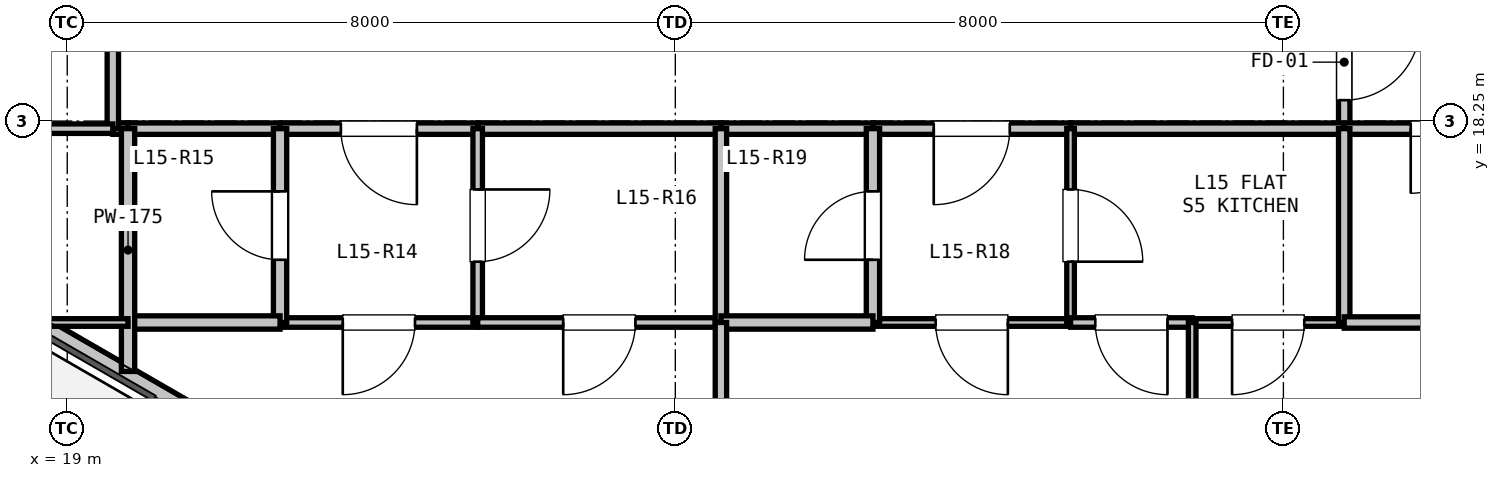
"""IFC4 building model, lengths in metres.
Left out: names, types, materials, properties, quantities, classifications, styles, units other than length and angle.
Written with IfcOpenShell. Run it as: python <this file> out.ifc"""

import sys

from ifc_helpers import new_model, si_unit, direction, frame, frame_2d, origin, place, context, subcontext, project, spatial, rectangle, extrude, element, fill, save


model = new_model("IFC4")
c1 = context("Model", 3, precision=1e-05, world=origin(), true_north=direction((0.0, 1.0)))
c2 = subcontext(c1, "Body", "Model", "MODEL_VIEW")
j1 = project(units=[si_unit("LENGTHUNIT", "METRE"), si_unit("PLANEANGLEUNIT", "RADIAN")], contexts=[c1])
p1 = place(None, origin())
s1 = spatial("IfcSite", under=j1, at=p1, CompositionType="ELEMENT")
p2 = place(p1, origin())
s2 = spatial("IfcBuilding", under=s1, at=p2, CompositionType="ELEMENT")
p3 = place(p2, frame((0.0, 0.0, 55.5)))
s3 = spatial("IfcBuildingStorey", under=s2, at=p3, CompositionType="ELEMENT", Elevation=55.5)
p4 = place(p3, frame((26.76, 10.896, 0.0), z_axis=(0.0, 0.0, 1.0), x_axis=(-0.866027351828, 0.499996625875, 0.0)))
e1 = element("IfcWall", 1, at=p4, inside=s3, PredefinedType="PARAPET", context=c2, shape_type="SweptSolid", body=[
    extrude(rectangle(XDim=11.973, YDim=0.2, at=frame_2d((5.987, 0.0))), origin(), (0.0, 0.0, 1.0), 0.2),
])
p5 = place(p3, frame((35.8, 19.9, 0.0), z_axis=(0.0, 0.0, 1.0), x_axis=(0.0, -1.0, 0.0)))
e2 = element("IfcWall", 2, at=p5, inside=s3, PredefinedType="PARTITIONING", context=c2, shape_type="SweptSolid", body=[
    extrude(rectangle(XDim=1.75, YDim=0.15, at=frame_2d((0.875, 0.0))), origin(), (0.0, 0.0, 1.0), 3.04),
])
p6 = place(p5, frame((0.375, 0.0, 0.0)))
e3 = element("IfcOpeningElement", 3, at=p6, cuts=e2, PredefinedType="OPENING", context=c2, shape_type="SweptSolid", body=[
    extrude(rectangle(XDim=1.0, YDim=2.15, at=frame_2d((0.5, 1.075))), frame((0.0, 0.085, 0.0), z_axis=(0.0, -1.0, 0.0), x_axis=(1.0, 0.0, 0.0)), (0.0, 0.0, 1.0), 0.17),
])
p7 = place(p3, frame((35.8, 18.15, 0.0), z_axis=(0.0, 0.0, 1.0), x_axis=(-1.0, 0.0, 0.0)))
e4 = element("IfcWall", 4, at=p7, inside=s3, PredefinedType="PARTITIONING", context=c2, shape_type="SweptSolid", body=[
    extrude(rectangle(XDim=3.6, YDim=0.15, at=frame_2d((1.8, 0.0))), origin(), (0.0, 0.0, 1.0), 3.04),
])
p8 = place(p3, frame((32.2, 18.15, 0.0), z_axis=(0.0, 0.0, 1.0), x_axis=(-1.0, 0.0, 0.0)))
e5 = element("IfcWall", 5, at=p8, inside=s3, PredefinedType="PARTITIONING", context=c2, shape_type="SweptSolid", body=[
    extrude(rectangle(XDim=2.6, YDim=0.15, at=frame_2d((1.3, 0.0))), origin(), (0.0, 0.0, 1.0), 3.04),
])
p9 = place(p8, frame((0.8, 0.0, 0.0)))
e6 = element("IfcOpeningElement", 6, at=p9, cuts=e5, PredefinedType="OPENING", context=c2, shape_type="SweptSolid", body=[
    extrude(rectangle(XDim=1.0, YDim=2.15, at=frame_2d((0.5, 1.075))), frame((0.0, 0.085, 0.0), z_axis=(0.0, -1.0, 0.0), x_axis=(1.0, 0.0, 0.0)), (0.0, 0.0, 1.0), 0.17),
])
p10 = place(p3, frame((29.6, 18.15, 0.0), z_axis=(0.0, 0.0, 1.0), x_axis=(-1.0, 0.0, 0.0)))
e7 = element("IfcWall", 7, at=p10, inside=s3, PredefinedType="PARTITIONING", context=c2, shape_type="SweptSolid", body=[
    extrude(rectangle(XDim=2.0, YDim=0.15, at=frame_2d((1.0, 0.0))), origin(), (0.0, 0.0, 1.0), 3.04),
])
p11 = place(p3, frame((27.6, 18.15, 0.0), z_axis=(0.0, 0.0, 1.0), x_axis=(-1.0, 0.0, 0.0)))
e8 = element("IfcWall", 8, at=p11, inside=s3, PredefinedType="PARTITIONING", context=c2, shape_type="SweptSolid", body=[
    extrude(rectangle(XDim=3.2, YDim=0.15, at=frame_2d((1.6, 0.0))), origin(), (0.0, 0.0, 1.0), 3.04),
])
p12 = place(p3, frame((24.4, 18.15, 0.0), z_axis=(0.0, 0.0, 1.0), x_axis=(-1.0, 0.0, 0.0)))
e9 = element("IfcWall", 9, at=p12, inside=s3, PredefinedType="PARTITIONING", context=c2, shape_type="SweptSolid", body=[
    extrude(rectangle(XDim=2.6, YDim=0.15, at=frame_2d((1.3, 0.0))), origin(), (0.0, 0.0, 1.0), 2.337),
])
p13 = place(p12, frame((0.8, 0.0, 0.0)))
e10 = element("IfcOpeningElement", 10, at=p13, cuts=e9, PredefinedType="OPENING", context=c2, shape_type="SweptSolid", body=[
    extrude(rectangle(XDim=1.0, YDim=2.15, at=frame_2d((0.5, 1.075))), frame((0.0, 0.085, 0.0), z_axis=(0.0, -1.0, 0.0), x_axis=(1.0, 0.0, 0.0)), (0.0, 0.0, 1.0), 0.17),
])
p14 = place(p3, frame((21.8, 18.15, 0.0), z_axis=(0.0, 0.0, 1.0), x_axis=(-1.0, 0.0, 0.0)))
e11 = element("IfcWall", 11, at=p14, inside=s3, PredefinedType="PARTITIONING", context=c2, shape_type="SweptSolid", body=[
    extrude(rectangle(XDim=2.0, YDim=0.15, at=frame_2d((1.0, 0.0))), origin(), (0.0, 0.0, 1.0), 3.04),
])
p15 = place(p3, frame((19.8, 18.15, 0.0), z_axis=(0.0, 0.0, 1.0), x_axis=(-1.0, 0.0, 0.0)))
e12 = element("IfcWall", 12, at=p15, inside=s3, PredefinedType="PARTITIONING", context=c2, shape_type="SweptSolid", body=[
    extrude(rectangle(XDim=0.2, YDim=0.15, at=frame_2d((0.1, 0.0))), origin(), (0.0, 0.0, 1.0), 3.04),
])
p16 = place(p3, frame((19.6, 18.15, 0.0), z_axis=(0.0, 0.0, 1.0), x_axis=(0.0, 1.0, 0.0)))
e13 = element("IfcWall", 13, at=p16, inside=s3, PredefinedType="PARTITIONING", context=c2, shape_type="SweptSolid", body=[
    extrude(rectangle(XDim=3.55, YDim=0.15, at=frame_2d((1.775, 0.0))), origin(), (0.0, 0.0, 1.0), 2.337),
])
p17 = place(p3, frame((38.4, 18.15, 0.0), z_axis=(0.0, 0.0, 1.0), x_axis=(-1.0, 0.0, 0.0)))
e14 = element("IfcWall", 14, at=p17, inside=s3, PredefinedType="PARTITIONING", context=c2, shape_type="SweptSolid", body=[
    extrude(rectangle(XDim=2.6, YDim=0.15, at=frame_2d((1.3, 0.0))), origin(), (0.0, 0.0, 1.0), 2.337),
])
p18 = place(p17, frame((0.875, 0.0, 0.0)))
e15 = element("IfcOpeningElement", 15, at=p18, cuts=e14, PredefinedType="OPENING", context=c2, shape_type="SweptSolid", body=[
    extrude(rectangle(XDim=0.85, YDim=2.1, at=frame_2d((0.425, 1.05))), frame((0.0, 0.085, 0.0), z_axis=(0.0, -1.0, 0.0), x_axis=(1.0, 0.0, 0.0)), (0.0, 0.0, 1.0), 0.17),
])
p19 = place(p3, frame((24.4, 15.6, 0.0), z_axis=(0.0, 0.0, 1.0), x_axis=(-1.0, 0.0, 0.0)))
e16 = element("IfcWall", 16, at=p19, inside=s3, PredefinedType="PARTITIONING", context=c2, shape_type="SweptSolid", body=[
    extrude(rectangle(XDim=2.6, YDim=0.125, at=frame_2d((1.3, 0.0))), origin(), (0.0, 0.0, 1.0), 3.04),
])
p20 = place(p19, frame((0.825, 0.0, 0.0)))
e17 = element("IfcOpeningElement", 17, at=p20, cuts=e16, PredefinedType="OPENING", context=c2, shape_type="SweptSolid", body=[
    extrude(rectangle(XDim=0.95, YDim=2.1, at=frame_2d((0.475, 1.05))), frame((0.0, 0.073, 0.0), z_axis=(0.0, -1.0, 0.0), x_axis=(1.0, 0.0, 0.0)), (0.0, 0.0, 1.0), 0.145),
])
p21 = place(p3, frame((21.8, 15.6, 0.0), z_axis=(0.0, 0.0, 1.0), x_axis=(0.0, 1.0, 0.0)))
e18 = element("IfcWall", 18, at=p21, inside=s3, PredefinedType="PLUMBINGWALL", context=c2, shape_type="SweptSolid", body=[
    extrude(rectangle(XDim=2.55, YDim=0.175, at=frame_2d((1.275, 0.0))), origin(), (0.0, 0.0, 1.0), 3.04),
])
p22 = place(p21, frame((0.825, 0.0, 0.0)))
e19 = element("IfcOpeningElement", 19, at=p22, cuts=e18, PredefinedType="OPENING", context=c2, shape_type="SweptSolid", body=[
    extrude(rectangle(XDim=0.9, YDim=2.1, at=frame_2d((0.45, 1.05))), frame((0.0, 0.097, 0.0), z_axis=(0.0, -1.0, 0.0), x_axis=(1.0, 0.0, 0.0)), (0.0, 0.0, 1.0), 0.195),
])
p23 = place(p3, frame((24.4, 18.15, 0.0), z_axis=(0.0, 0.0, 1.0), x_axis=(0.0, -1.0, 0.0)))
e20 = element("IfcWall", 20, at=p23, inside=s3, PredefinedType="PARTITIONING", context=c2, shape_type="SweptSolid", body=[
    extrude(rectangle(XDim=2.55, YDim=0.125, at=frame_2d((1.275, 0.0))), origin(), (0.0, 0.0, 1.0), 2.337),
])
p24 = place(p23, frame((0.8, 0.0, 0.0)))
e21 = element("IfcOpeningElement", 21, at=p24, cuts=e20, PredefinedType="OPENING", context=c2, shape_type="SweptSolid", body=[
    extrude(rectangle(XDim=0.95, YDim=2.1, at=frame_2d((0.475, 1.05))), frame((0.0, 0.073, 0.0), z_axis=(0.0, -1.0, 0.0), x_axis=(1.0, 0.0, 0.0)), (0.0, 0.0, 1.0), 0.145),
])
p25 = place(p3, frame((32.2, 15.6, 0.0), z_axis=(0.0, 0.0, 1.0), x_axis=(-1.0, 0.0, 0.0)))
e22 = element("IfcWall", 22, at=p25, inside=s3, PredefinedType="PARTITIONING", context=c2, shape_type="SweptSolid", body=[
    extrude(rectangle(XDim=2.6, YDim=0.1, at=frame_2d((1.3, 0.0))), origin(), (0.0, 0.0, 1.0), 3.04),
])
p26 = place(p25, frame((0.825, 0.0, 0.0)))
e23 = element("IfcOpeningElement", 23, at=p26, cuts=e22, PredefinedType="OPENING", context=c2, shape_type="SweptSolid", body=[
    extrude(rectangle(XDim=0.95, YDim=2.1, at=frame_2d((0.475, 1.05))), frame((0.0, 0.06, 0.0), z_axis=(0.0, -1.0, 0.0), x_axis=(1.0, 0.0, 0.0)), (0.0, 0.0, 1.0), 0.12),
])
p27 = place(p3, frame((29.6, 15.6, 0.0), z_axis=(0.0, 0.0, 1.0), x_axis=(0.0, 1.0, 0.0)))
e24 = element("IfcWall", 24, at=p27, inside=s3, PredefinedType="PLUMBINGWALL", context=c2, shape_type="SweptSolid", body=[
    extrude(rectangle(XDim=2.55, YDim=0.175, at=frame_2d((1.275, 0.0))), origin(), (0.0, 0.0, 1.0), 3.04),
])
p28 = place(p27, frame((0.825, 0.0, 0.0)))
e25 = element("IfcOpeningElement", 25, at=p28, cuts=e24, PredefinedType="OPENING", context=c2, shape_type="SweptSolid", body=[
    extrude(rectangle(XDim=0.9, YDim=2.1, at=frame_2d((0.45, 1.05))), frame((0.0, 0.097, 0.0), z_axis=(0.0, -1.0, 0.0), x_axis=(1.0, 0.0, 0.0)), (0.0, 0.0, 1.0), 0.195),
])
p29 = place(p3, frame((32.2, 18.15, 0.0), z_axis=(0.0, 0.0, 1.0), x_axis=(0.0, -1.0, 0.0)))
e26 = element("IfcWall", 26, at=p29, inside=s3, PredefinedType="PARTITIONING", context=c2, shape_type="SweptSolid", body=[
    extrude(rectangle(XDim=2.55, YDim=0.1, at=frame_2d((1.275, 0.0))), origin(), (0.0, 0.0, 1.0), 3.04),
])
p30 = place(p29, frame((0.8, 0.0, 0.0)))
e27 = element("IfcOpeningElement", 27, at=p30, cuts=e26, PredefinedType="OPENING", context=c2, shape_type="SweptSolid", body=[
    extrude(rectangle(XDim=0.95, YDim=2.1, at=frame_2d((0.475, 1.05))), frame((0.0, 0.06, 0.0), z_axis=(0.0, -1.0, 0.0), x_axis=(1.0, 0.0, 0.0)), (0.0, 0.0, 1.0), 0.12),
])
p31 = place(p3, frame((21.8, 15.6, 0.0), z_axis=(0.0, 0.0, 1.0), x_axis=(-1.0, 0.0, 0.0)))
e28 = element("IfcWall", 28, at=p31, inside=s3, PredefinedType="PLUMBINGWALL", context=c2, shape_type="SweptSolid", body=[
    extrude(rectangle(XDim=2.0, YDim=0.175, at=frame_2d((1.0, 0.0))), origin(), (0.0, 0.0, 1.0), 2.365),
])
p32 = place(p3, frame((19.8, 14.956, 0.0), z_axis=(0.0, 0.0, 1.0), x_axis=(0.0, 1.0, 0.0)))
e29 = element("IfcWall", 29, at=p32, inside=s3, PredefinedType="PLUMBINGWALL", context=c2, shape_type="SweptSolid", body=[
    extrude(rectangle(XDim=3.194, YDim=0.175, at=frame_2d((1.597, 0.0))), origin(), (0.0, 0.0, 1.0), 2.365),
])
p33 = place(p3, frame((27.6, 15.6, 0.0), z_axis=(0.0, 0.0, 1.0), x_axis=(-1.0, 0.0, 0.0)))
e30 = element("IfcWall", 30, at=p33, inside=s3, PredefinedType="PARTITIONING", context=c2, shape_type="SweptSolid", body=[
    extrude(rectangle(XDim=3.2, YDim=0.125, at=frame_2d((1.6, 0.0))), origin(), (0.0, 0.0, 1.0), 2.337),
])
p34 = place(p33, frame((1.125, 0.0, 0.0)))
e31 = element("IfcOpeningElement", 31, at=p34, cuts=e30, PredefinedType="OPENING", context=c2, shape_type="SweptSolid", body=[
    extrude(rectangle(XDim=0.95, YDim=2.1, at=frame_2d((0.475, 1.05))), frame((0.0, 0.073, 0.0), z_axis=(0.0, -1.0, 0.0), x_axis=(1.0, 0.0, 0.0)), (0.0, 0.0, 1.0), 0.145),
])
p35 = place(p3, frame((27.6, 18.15, 0.0), z_axis=(0.0, 0.0, 1.0), x_axis=(0.0, -1.0, 0.0)))
e32 = element("IfcWall", 32, at=p35, inside=s3, PredefinedType="PARTITIONING", context=c2, shape_type="SweptSolid", body=[
    extrude(rectangle(XDim=2.55, YDim=0.15, at=frame_2d((1.275, 0.0))), origin(), (0.0, 0.0, 1.0), 3.04),
])
p36 = place(p3, frame((29.6, 15.6, 0.0), z_axis=(0.0, 0.0, 1.0), x_axis=(-1.0, 0.0, 0.0)))
e33 = element("IfcWall", 33, at=p36, inside=s3, PredefinedType="PLUMBINGWALL", context=c2, shape_type="SweptSolid", body=[
    extrude(rectangle(XDim=2.0, YDim=0.175, at=frame_2d((1.0, 0.0))), origin(), (0.0, 0.0, 1.0), 3.04),
])
p37 = place(p3, frame((35.8, 15.6, 0.0), z_axis=(0.0, 0.0, 1.0), x_axis=(-1.0, 0.0, 0.0)))
e34 = element("IfcWall", 34, at=p37, inside=s3, PredefinedType="PARTITIONING", context=c2, shape_type="SweptSolid", body=[
    extrude(rectangle(XDim=2.0, YDim=0.1, at=frame_2d((1.0, 0.0))), origin(), (0.0, 0.0, 1.0), 3.04),
])
p38 = place(p37, frame((0.525, 0.0, 0.0)))
e35 = element("IfcOpeningElement", 35, at=p38, cuts=e34, PredefinedType="OPENING", context=c2, shape_type="SweptSolid", body=[
    extrude(rectangle(XDim=0.95, YDim=2.1, at=frame_2d((0.475, 1.05))), frame((0.0, 0.06, 0.0), z_axis=(0.0, -1.0, 0.0), x_axis=(1.0, 0.0, 0.0)), (0.0, 0.0, 1.0), 0.12),
])
p39 = place(p3, frame((33.8, 15.6, 0.0), z_axis=(0.0, 0.0, 1.0), x_axis=(-1.0, 0.0, 0.0)))
e36 = element("IfcWall", 36, at=p39, inside=s3, PredefinedType="PARTITIONING", context=c2, shape_type="SweptSolid", body=[
    extrude(rectangle(XDim=1.6, YDim=0.125, at=frame_2d((0.8, 0.0))), origin(), (0.0, 0.0, 1.0), 3.04),
])
p40 = place(p39, frame((0.325, 0.0, 0.0)))
e37 = element("IfcOpeningElement", 37, at=p40, cuts=e36, PredefinedType="OPENING", context=c2, shape_type="SweptSolid", body=[
    extrude(rectangle(XDim=0.95, YDim=2.1, at=frame_2d((0.475, 1.05))), frame((0.0, 0.073, 0.0), z_axis=(0.0, -1.0, 0.0), x_axis=(1.0, 0.0, 0.0)), (0.0, 0.0, 1.0), 0.145),
])
p41 = place(p3, frame((35.8, 18.15, 0.0), z_axis=(0.0, 0.0, 1.0), x_axis=(0.0, -1.0, 0.0)))
e38 = element("IfcWall", 38, at=p41, inside=s3, PredefinedType="PARTITIONING", context=c2, shape_type="SweptSolid", body=[
    extrude(rectangle(XDim=2.55, YDim=0.15, at=frame_2d((1.275, 0.0))), origin(), (0.0, 0.0, 1.0), 3.04),
])
p42 = place(p3, frame((19.6, 18.15, 0.0), z_axis=(0.0, 0.0, 1.0), x_axis=(-1.0, 0.0, 0.0)))
e39 = element("IfcWall", 39, at=p42, inside=s3, PredefinedType="PARTITIONING", context=c2, shape_type="SweptSolid", body=[
    extrude(rectangle(XDim=2.45, YDim=0.125, at=frame_2d((1.225, 0.0))), origin(), (0.0, 0.0, 1.0), 3.04),
])
p43 = place(p3, frame((43.688, 15.6, 0.0), z_axis=(0.0, 0.0, 1.0), x_axis=(-1.0, 0.0, 0.0)))
e40 = element("IfcWall", 40, at=p43, inside=s3, PredefinedType="PARTITIONING", context=c2, shape_type="SweptSolid", body=[
    extrude(rectangle(XDim=7.888, YDim=0.15, at=frame_2d((3.944, 0.0))), origin(), (0.0, 0.0, 1.0), 2.337),
])
p44 = place(p3, frame((18.678, 15.6, 0.0), z_axis=(0.0, 0.0, 1.0), x_axis=(1.0, 0.0, 0.0)))
e41 = element("IfcWall", 41, at=p44, inside=s3, PredefinedType="PARTITIONING", context=c2, shape_type="SweptSolid", body=[
    extrude(rectangle(XDim=1.122, YDim=0.1, at=frame_2d((0.561, 0.0))), origin(), (0.0, 0.0, 1.0), 2.365),
])
p45 = place(p3, frame((27.6, 15.6, 0.0), z_axis=(0.0, 0.0, 1.0), x_axis=(0.0, -1.0, 0.0)))
e42 = element("IfcWall", 42, at=p45, inside=s3, PredefinedType="PARTITIONING", context=c2, shape_type="SweptSolid", body=[
    extrude(rectangle(XDim=4.838, YDim=0.15, at=frame_2d((2.419, 0.0))), origin(), (0.0, 0.0, 1.0), 2.337),
])
p46 = place(p3, frame((33.8, 15.6, 0.0), z_axis=(0.0, 0.0, 1.0), x_axis=(0.0, -1.0, 0.0)))
e43 = element("IfcWall", 43, at=p46, inside=s3, PredefinedType="PARTITIONING", context=c2, shape_type="SweptSolid", body=[
    extrude(rectangle(XDim=5.98, YDim=0.1, at=frame_2d((2.99, 0.0))), origin(), (0.0, 0.0, 1.0), 3.04),
])
p47 = place(p46, frame((2.515, 0.0, 0.0)))
e44 = element("IfcOpeningElement", 44, at=p47, cuts=e43, PredefinedType="OPENING", context=c2, shape_type="SweptSolid", body=[
    extrude(rectangle(XDim=0.95, YDim=2.1, at=frame_2d((0.475, 1.05))), frame((0.0, 0.06, 0.0), z_axis=(0.0, -1.0, 0.0), x_axis=(1.0, 0.0, 0.0)), (0.0, 0.0, 1.0), 0.12),
])
p48 = place(p6, origin())
e45 = element("IfcDoor", 45, at=p48, inside=s3, OperationType="SINGLE_SWING_LEFT", PredefinedType="DOOR", context=c2, shape_type="SweptSolid", body=[
    extrude(rectangle(XDim=1.0, YDim=2.15, at=frame_2d((0.5, 1.075))), frame((0.0, 0.025, 0.0), z_axis=(0.0, -1.0, 0.0), x_axis=(1.0, 0.0, 0.0)), (0.0, 0.0, 1.0), 0.05),
])
fill(e3, e45)
p49 = place(p13, origin())
e46 = element("IfcDoor", 46, at=p49, inside=s3, OperationType="SINGLE_SWING_LEFT", PredefinedType="DOOR", context=c2, shape_type="SweptSolid", body=[
    extrude(rectangle(XDim=1.0, YDim=2.15, at=frame_2d((0.5, 1.075))), frame((0.0, 0.025, 0.0), z_axis=(0.0, -1.0, 0.0), x_axis=(1.0, 0.0, 0.0)), (0.0, 0.0, 1.0), 0.05),
])
fill(e10, e46)
p50 = place(p9, origin())
e47 = element("IfcDoor", 47, at=p50, inside=s3, OperationType="SINGLE_SWING_RIGHT", PredefinedType="DOOR", context=c2, shape_type="SweptSolid", body=[
    extrude(rectangle(XDim=1.0, YDim=2.15, at=frame_2d((0.5, 1.075))), frame((0.0, 0.025, 0.0), z_axis=(0.0, -1.0, 0.0), x_axis=(1.0, 0.0, 0.0)), (0.0, 0.0, 1.0), 0.05),
])
fill(e6, e47)
p51 = place(p18, origin())
e48 = element("IfcDoor", 48, at=p51, inside=s3, OperationType="SINGLE_SWING_RIGHT", PredefinedType="DOOR", context=c2, shape_type="SweptSolid", body=[
    extrude(rectangle(XDim=0.85, YDim=2.1, at=frame_2d((0.425, 1.05))), frame((0.0, 0.025, 0.0), z_axis=(0.0, -1.0, 0.0), x_axis=(1.0, 0.0, 0.0)), (0.0, 0.0, 1.0), 0.05),
])
fill(e15, e48)
p52 = place(p22, origin())
e49 = element("IfcDoor", 49, at=p52, inside=s3, OperationType="SINGLE_SWING_RIGHT", PredefinedType="DOOR", context=c2, shape_type="SweptSolid", body=[
    extrude(rectangle(XDim=0.9, YDim=2.1, at=frame_2d((0.45, 1.05))), frame((0.0, 0.025, 0.0), z_axis=(0.0, -1.0, 0.0), x_axis=(1.0, 0.0, 0.0)), (0.0, 0.0, 1.0), 0.05),
])
fill(e19, e49)
p53 = place(p24, origin())
e50 = element("IfcDoor", 50, at=p53, inside=s3, OperationType="SINGLE_SWING_LEFT", PredefinedType="DOOR", context=c2, shape_type="SweptSolid", body=[
    extrude(rectangle(XDim=0.95, YDim=2.1, at=frame_2d((0.475, 1.05))), frame((0.0, 0.025, 0.0), z_axis=(0.0, -1.0, 0.0), x_axis=(1.0, 0.0, 0.0)), (0.0, 0.0, 1.0), 0.05),
])
fill(e21, e50)
p54 = place(p20, origin())
e51 = element("IfcDoor", 51, at=p54, inside=s3, OperationType="SINGLE_SWING_RIGHT", PredefinedType="DOOR", context=c2, shape_type="SweptSolid", body=[
    extrude(rectangle(XDim=0.95, YDim=2.1, at=frame_2d((0.475, 1.05))), frame((0.0, 0.025, 0.0), z_axis=(0.0, -1.0, 0.0), x_axis=(1.0, 0.0, 0.0)), (0.0, 0.0, 1.0), 0.05),
])
fill(e17, e51)
p55 = place(p28, origin())
e52 = element("IfcDoor", 52, at=p55, inside=s3, OperationType="SINGLE_SWING_LEFT", PredefinedType="DOOR", context=c2, shape_type="SweptSolid", body=[
    extrude(rectangle(XDim=0.9, YDim=2.1, at=frame_2d((0.45, 1.05))), frame((0.0, 0.025, 0.0), z_axis=(0.0, -1.0, 0.0), x_axis=(1.0, 0.0, 0.0)), (0.0, 0.0, 1.0), 0.05),
])
fill(e25, e52)
p56 = place(p30, origin())
e53 = element("IfcDoor", 53, at=p56, inside=s3, OperationType="SINGLE_SWING_RIGHT", PredefinedType="DOOR", context=c2, shape_type="SweptSolid", body=[
    extrude(rectangle(XDim=0.95, YDim=2.1, at=frame_2d((0.475, 1.05))), frame((0.0, 0.025, 0.0), z_axis=(0.0, -1.0, 0.0), x_axis=(1.0, 0.0, 0.0)), (0.0, 0.0, 1.0), 0.05),
])
fill(e27, e53)
p57 = place(p26, origin())
e54 = element("IfcDoor", 54, at=p57, inside=s3, OperationType="SINGLE_SWING_LEFT", PredefinedType="DOOR", context=c2, shape_type="SweptSolid", body=[
    extrude(rectangle(XDim=0.95, YDim=2.1, at=frame_2d((0.475, 1.05))), frame((0.0, 0.025, 0.0), z_axis=(0.0, -1.0, 0.0), x_axis=(1.0, 0.0, 0.0)), (0.0, 0.0, 1.0), 0.05),
])
fill(e23, e54)
p58 = place(p34, origin())
e55 = element("IfcDoor", 55, at=p58, inside=s3, OperationType="SINGLE_SWING_RIGHT", PredefinedType="DOOR", context=c2, shape_type="SweptSolid", body=[
    extrude(rectangle(XDim=0.95, YDim=2.1, at=frame_2d((0.475, 1.05))), frame((0.0, 0.025, 0.0), z_axis=(0.0, -1.0, 0.0), x_axis=(1.0, 0.0, 0.0)), (0.0, 0.0, 1.0), 0.05),
])
fill(e31, e55)
p59 = place(p40, origin())
e56 = element("IfcDoor", 56, at=p59, inside=s3, OperationType="SINGLE_SWING_LEFT", PredefinedType="DOOR", context=c2, shape_type="SweptSolid", body=[
    extrude(rectangle(XDim=0.95, YDim=2.1, at=frame_2d((0.475, 1.05))), frame((0.0, 0.025, 0.0), z_axis=(0.0, -1.0, 0.0), x_axis=(1.0, 0.0, 0.0)), (0.0, 0.0, 1.0), 0.05),
])
fill(e37, e56)
p60 = place(p38, origin())
e57 = element("IfcDoor", 57, at=p60, inside=s3, OperationType="SINGLE_SWING_RIGHT", PredefinedType="DOOR", context=c2, shape_type="SweptSolid", body=[
    extrude(rectangle(XDim=0.95, YDim=2.1, at=frame_2d((0.475, 1.05))), frame((0.0, 0.025, 0.0), z_axis=(0.0, -1.0, 0.0), x_axis=(1.0, 0.0, 0.0)), (0.0, 0.0, 1.0), 0.05),
])
fill(e35, e57)
save(model, sys.argv[1])
